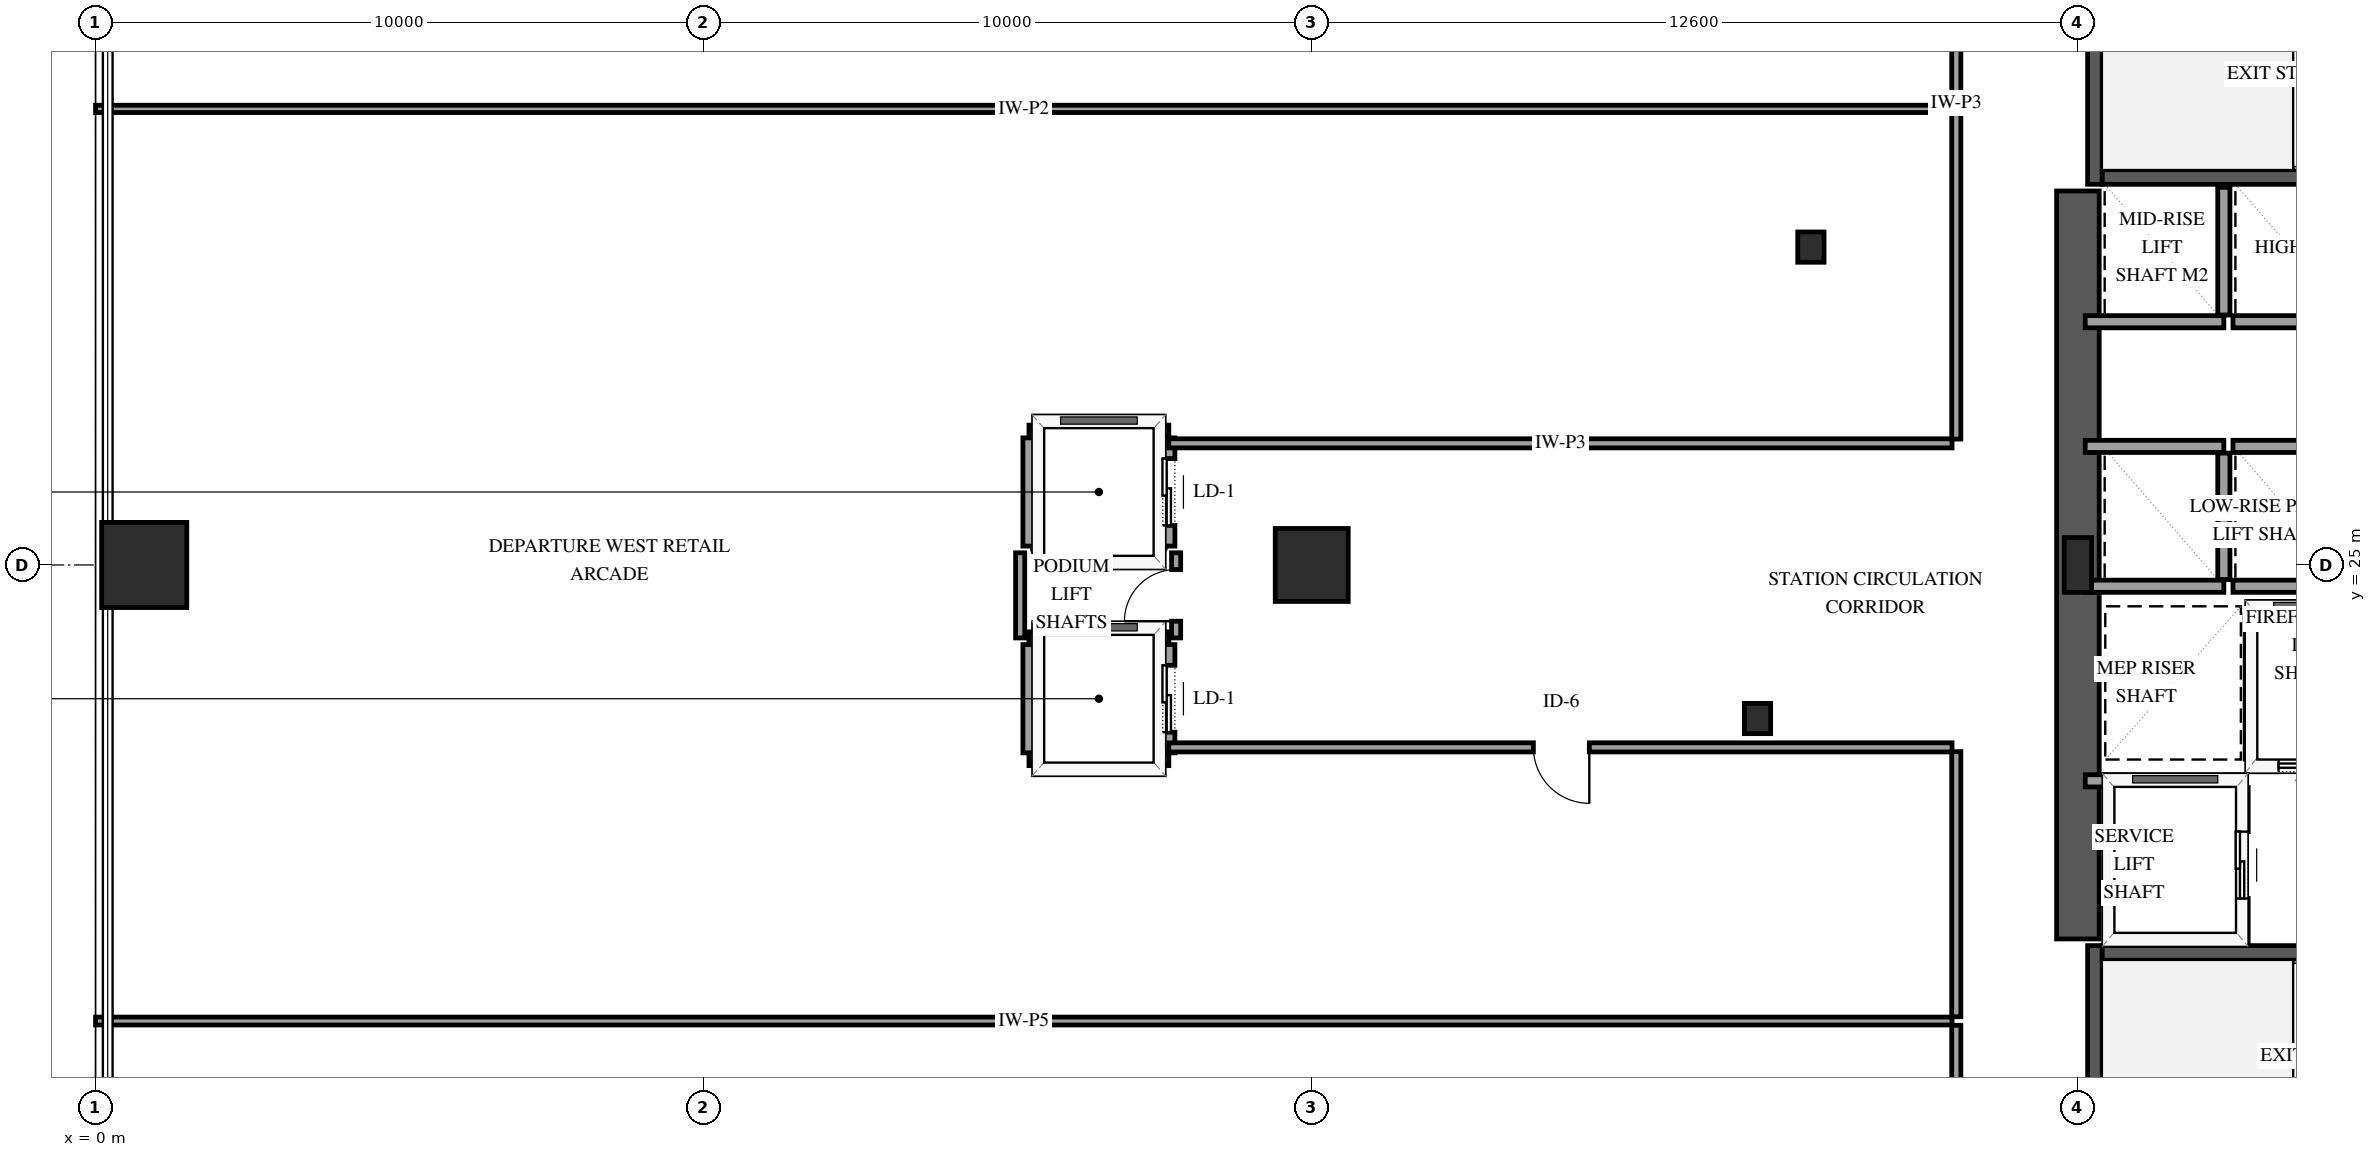
"""IFC4 building model, lengths in metres.
Left out: names, types, materials, properties, quantities, classifications, styles, units other than length and angle.
Written with IfcOpenShell. Run it as: python <this file> out.ifc"""

import sys

from ifc_helpers import new_model, si_unit, direction, frame, frame_2d, origin, origin_2d, place, context, subcontext, project, spatial, rectangle, i_section, extrude, element, fill, save


model = new_model("IFC4")
c1 = context("Model", 3, precision=1e-05, world=origin(), true_north=direction((0.0, 1.0)))
c2 = subcontext(c1, "Body", "Model", "MODEL_VIEW")
j1 = project(units=[si_unit("LENGTHUNIT", "METRE"), si_unit("PLANEANGLEUNIT", "RADIAN")], contexts=[c1])
p1 = place(None, origin())
s1 = spatial("IfcSite", under=j1, at=p1, CompositionType="ELEMENT")
p2 = place(p1, origin())
s2 = spatial("IfcBuilding", under=s1, at=p2, CompositionType="ELEMENT")
p3 = place(p2, frame((0.0, 0.0, 16.2)))
s3 = spatial("IfcBuildingStorey", under=s2, at=p3, CompositionType="ELEMENT", Elevation=16.2)
p4 = place(p3, frame((32.88, 15.11, 0.0), z_axis=(0.0, 0.0, 1.0), x_axis=(0.0, 1.0, 0.0)))
e1 = element("IfcWall", 1, at=p4, inside=s3, PredefinedType="SHEAR", context=c2, shape_type="SweptSolid", body=[
    extrude(rectangle(XDim=3.63, YDim=0.24, at=frame_2d((1.815, 0.0))), origin(), (0.0, 0.0, 1.0), 4.5),
])
p5 = place(p3, frame((33.0, 18.62, 0.0), z_axis=(0.0, 0.0, 1.0), x_axis=(1.0, 0.0, 0.0)))
e2 = element("IfcWall", 2, at=p5, inside=s3, PredefinedType="SHEAR", context=c2, shape_type="SweptSolid", body=[
    extrude(rectangle(XDim=8.0, YDim=0.24, at=frame_2d((4.0, 0.0))), origin(), (0.0, 0.0, 1.0), 4.5),
])
p6 = place(p3, frame((32.88, 31.26, 0.0), z_axis=(0.0, 0.0, 1.0), x_axis=(0.0, 1.0, 0.0)))
e3 = element("IfcWall", 3, at=p6, inside=s3, PredefinedType="SHEAR", context=c2, shape_type="SweptSolid", body=[
    extrude(rectangle(XDim=3.63, YDim=0.24, at=frame_2d((1.815, 0.0))), origin(), (0.0, 0.0, 1.0), 4.5),
])
p7 = place(p3, frame((33.0, 31.38, 0.0), z_axis=(0.0, 0.0, 1.0), x_axis=(1.0, 0.0, 0.0)))
e4 = element("IfcWall", 4, at=p7, inside=s3, PredefinedType="SHEAR", context=c2, shape_type="SweptSolid", body=[
    extrude(rectangle(XDim=8.0, YDim=0.24, at=frame_2d((4.0, 0.0))), origin(), (0.0, 0.0, 1.0), 4.5),
])
p8 = place(p3, frame((32.6, 18.85, 0.0), z_axis=(0.0, 0.0, 1.0), x_axis=(0.0, 1.0, 0.0)))
e5 = element("IfcWall", 5, at=p8, inside=s3, PredefinedType="SHEAR", context=c2, shape_type="SweptSolid", body=[
    extrude(rectangle(XDim=12.3, YDim=0.7, at=frame_2d((6.15, 0.0))), origin(), (0.0, 0.0, 1.0), 4.5),
])
p9 = place(p3, frame((32.6, 25.0, 0.0), z_axis=(0.0, 0.0, 1.0), x_axis=(1.0, 0.0, 0.0)))
e6 = element("IfcColumn", 6, at=p9, inside=s3, PredefinedType="PILASTER", context=c2, shape_type="SweptSolid", body=[
    extrude(rectangle(XDim=0.45, YDim=0.9, at=origin_2d()), origin(), (0.0, 0.0, 1.0), 4.5),
])
p10 = place(p3, frame((0.8, 25.0, 0.0), z_axis=(0.0, 0.0, 1.0), x_axis=(1.0, 0.0, 0.0)))
e7 = element("IfcColumn", 7, at=p10, inside=s3, PredefinedType="COLUMN", context=c2, shape_type="SweptSolid", body=[
    extrude(rectangle(XDim=1.4, YDim=1.4, at=origin_2d()), origin(), (0.0, 0.0, 1.0), 4.5),
])
p11 = place(p3, frame((20.0, 25.0, 0.0), z_axis=(0.0, 0.0, 1.0), x_axis=(1.0, 0.0, 0.0)))
e8 = element("IfcColumn", 8, at=p11, inside=s3, PredefinedType="COLUMN", context=c2, shape_type="SweptSolid", body=[
    extrude(rectangle(XDim=1.2, YDim=1.2, at=origin_2d()), origin(), (0.0, 0.0, 1.0), 4.5),
])
for number, where, z_axis, x_axis in (
    (9, (28.209, 30.227, 0.0), (0.0, 0.0, 1.0), (1.0, 0.0, 0.0)),
    (10, (27.331, 22.475, 0.0), (0.0, 0.0, 1.0), (1.0, 0.0, 0.0)),
):
    element("IfcColumn", number, at=place(p3, frame(where, z_axis=z_axis, x_axis=x_axis)), inside=s3, PredefinedType="COLUMN", context=c2, shape_type="SweptSolid", body=[
        extrude(i_section(OverallWidth=0.432, OverallDepth=0.498, WebThickness=0.056, FlangeThickness=0.089, FilletRadius=0.038, at=origin_2d()), origin(), (0.0, 0.0, 1.0), 4.5),
    ])
p12 = place(p3, frame((35.45, 21.7, 0.0), z_axis=(0.0, 0.0, 1.0), x_axis=(1.0, 0.0, 0.0)))
e11 = element("IfcWall", 11, at=p12, inside=s3, PredefinedType="SOLIDWALL", context=c2, shape_type="SweptSolid", body=[
    extrude(rectangle(XDim=2.0, YDim=0.2, at=frame_2d((1.0, 0.0))), origin(), (0.0, 0.0, 1.0), 4.18),
])
p13 = place(p12, frame((0.45, 0.0, 0.0)))
e12 = element("IfcOpeningElement", 12, at=p13, cuts=e11, PredefinedType="OPENING", context=c2, shape_type="SweptSolid", body=[
    extrude(rectangle(XDim=1.1, YDim=2.15, at=frame_2d((0.55, 1.075))), frame((0.0, 0.11, 0.0), z_axis=(0.0, -1.0, 0.0), x_axis=(1.0, 0.0, 0.0)), (0.0, 0.0, 1.0), 0.22),
])
p14 = place(p3, frame((35.45, 24.3, 0.0), z_axis=(0.0, 0.0, 1.0), x_axis=(1.0, 0.0, 0.0)))
e13 = element("IfcWall", 13, at=p14, inside=s3, PredefinedType="SOLIDWALL", context=c2, shape_type="SweptSolid", body=[
    extrude(rectangle(XDim=2.0, YDim=0.2, at=frame_2d((1.0, 0.0))), origin(), (0.0, 0.0, 1.0), 4.18),
])
p15 = place(p3, frame((35.45, 21.81, 0.0), z_axis=(0.0, 0.0, 1.0), x_axis=(0.0, 1.0, 0.0)))
e14 = element("IfcWall", 14, at=p15, inside=s3, PredefinedType="SOLIDWALL", context=c2, shape_type="SweptSolid", body=[
    extrude(rectangle(XDim=2.38, YDim=0.2, at=frame_2d((1.19, 0.0))), origin(), (0.0, 0.0, 1.0), 4.18),
])
p16 = place(p3, frame((32.72, 21.45, 0.0), z_axis=(0.0, 0.0, 1.0), x_axis=(1.0, 0.0, 0.0)))
e15 = element("IfcWall", 15, at=p16, inside=s3, PredefinedType="SOLIDWALL", context=c2, shape_type="SweptSolid", body=[
    extrude(rectangle(XDim=2.58, YDim=0.2, at=frame_2d((1.29, 0.0))), origin(), (0.0, 0.0, 1.0), 4.18),
])
p17 = place(p3, frame((35.3, 18.79, 0.0), z_axis=(0.0, 0.0, 1.0), x_axis=(0.0, 1.0, 0.0)))
e16 = element("IfcWall", 16, at=p17, inside=s3, PredefinedType="SOLIDWALL", context=c2, shape_type="SweptSolid", body=[
    extrude(rectangle(XDim=2.55, YDim=0.2, at=frame_2d((1.275, 0.0))), origin(), (0.0, 0.0, 1.0), 4.18),
])
p18 = place(p17, frame((0.725, 0.0, 0.0)))
e17 = element("IfcOpeningElement", 17, at=p18, cuts=e16, PredefinedType="OPENING", context=c2, shape_type="SweptSolid", body=[
    extrude(rectangle(XDim=1.1, YDim=2.15, at=frame_2d((0.55, 1.075))), frame((0.0, 0.11, 0.0), z_axis=(0.0, -1.0, 0.0), x_axis=(1.0, 0.0, 0.0)), (0.0, 0.0, 1.0), 0.22),
])
for number, where, z_axis, x_axis in (
    (18, (15.35, 21.8, 0.0), (0.0, 0.0, 1.0), (1.0, 0.0, 0.0)),
    (19, (15.35, 23.8, 0.0), (0.0, 0.0, 1.0), (1.0, 0.0, 0.0)),
):
    element("IfcWall", number, at=place(p3, frame(where, z_axis=z_axis, x_axis=x_axis)), inside=s3, PredefinedType="SOLIDWALL", context=c2, shape_type="SweptSolid", body=[
        extrude(rectangle(XDim=2.3, YDim=0.2, at=frame_2d((1.15, 0.0))), origin(), (0.0, 0.0, 1.0), 4.18),
    ])
p19 = place(p3, frame((15.35, 21.91, 0.0), z_axis=(0.0, 0.0, 1.0), x_axis=(0.0, 1.0, 0.0)))
e20 = element("IfcWall", 20, at=p19, inside=s3, PredefinedType="SOLIDWALL", context=c2, shape_type="SweptSolid", body=[
    extrude(rectangle(XDim=1.78, YDim=0.2, at=frame_2d((0.89, 0.0))), origin(), (0.0, 0.0, 1.0), 4.18),
])
p20 = place(p3, frame((17.65, 21.91, 0.0), z_axis=(0.0, 0.0, 1.0), x_axis=(0.0, 1.0, 0.0)))
e21 = element("IfcWall", 21, at=p20, inside=s3, PredefinedType="SOLIDWALL", context=c2, shape_type="SweptSolid", body=[
    extrude(rectangle(XDim=1.78, YDim=0.2, at=frame_2d((0.89, 0.0))), origin(), (0.0, 0.0, 1.0), 4.18),
])
p21 = place(p20, frame((0.34, 0.0, 0.0)))
e22 = element("IfcOpeningElement", 22, at=p21, cuts=e21, PredefinedType="OPENING", context=c2, shape_type="SweptSolid", body=[
    extrude(rectangle(XDim=1.1, YDim=2.15, at=frame_2d((0.55, 1.075))), frame((0.0, 0.11, 0.0), z_axis=(0.0, -1.0, 0.0), x_axis=(1.0, 0.0, 0.0)), (0.0, 0.0, 1.0), 0.22),
])
p22 = place(p3, frame((15.35, 27.2, 0.0), z_axis=(0.0, 0.0, 1.0), x_axis=(1.0, 0.0, 0.0)))
e23 = element("IfcWall", 23, at=p22, inside=s3, PredefinedType="SOLIDWALL", context=c2, shape_type="SweptSolid", body=[
    extrude(rectangle(XDim=2.3, YDim=0.2, at=frame_2d((1.15, 0.0))), origin(), (0.0, 0.0, 1.0), 4.18),
])
p23 = place(p3, frame((15.35, 25.31, 0.0), z_axis=(0.0, 0.0, 1.0), x_axis=(0.0, 1.0, 0.0)))
e24 = element("IfcWall", 24, at=p23, inside=s3, PredefinedType="SOLIDWALL", context=c2, shape_type="SweptSolid", body=[
    extrude(rectangle(XDim=1.78, YDim=0.2, at=frame_2d((0.89, 0.0))), origin(), (0.0, 0.0, 1.0), 4.18),
])
p24 = place(p3, frame((17.65, 25.31, 0.0), z_axis=(0.0, 0.0, 1.0), x_axis=(0.0, 1.0, 0.0)))
e25 = element("IfcWall", 25, at=p24, inside=s3, PredefinedType="SOLIDWALL", context=c2, shape_type="SweptSolid", body=[
    extrude(rectangle(XDim=1.78, YDim=0.2, at=frame_2d((0.89, 0.0))), origin(), (0.0, 0.0, 1.0), 4.18),
])
p25 = place(p24, frame((0.34, 0.0, 0.0)))
e26 = element("IfcOpeningElement", 26, at=p25, cuts=e25, PredefinedType="OPENING", context=c2, shape_type="SweptSolid", body=[
    extrude(rectangle(XDim=1.1, YDim=2.15, at=frame_2d((0.55, 1.075))), frame((0.0, 0.11, 0.0), z_axis=(0.0, -1.0, 0.0), x_axis=(1.0, 0.0, 0.0)), (0.0, 0.0, 1.0), 0.22),
])
for number, where, z_axis, x_axis in (
    (27, (32.72, 24.65, 0.0), (0.0, 0.0, 1.0), (1.0, 0.0, 0.0)),
    (28, (32.72, 26.95, 0.0), (0.0, 0.0, 1.0), (1.0, 0.0, 0.0)),
):
    element("IfcWall", number, at=place(p3, frame(where, z_axis=z_axis, x_axis=x_axis)), inside=s3, PredefinedType="SOLIDWALL", context=c2, shape_type="SweptSolid", body=[
        extrude(rectangle(XDim=2.28, YDim=0.2, at=frame_2d((1.14, 0.0))), origin(), (0.0, 0.0, 1.0), 4.18),
    ])
p26 = place(p3, frame((35.0, 24.76, 0.0), z_axis=(0.0, 0.0, 1.0), x_axis=(0.0, 1.0, 0.0)))
e29 = element("IfcWall", 29, at=p26, inside=s3, PredefinedType="SOLIDWALL", context=c2, shape_type="SweptSolid", body=[
    extrude(rectangle(XDim=2.08, YDim=0.2, at=frame_2d((1.04, 0.0))), origin(), (0.0, 0.0, 1.0), 4.18),
])
for number, where, z_axis, x_axis in (
    (30, (35.15, 24.65, 0.0), (0.0, 0.0, 1.0), (1.0, 0.0, 0.0)),
    (31, (35.15, 26.95, 0.0), (0.0, 0.0, 1.0), (1.0, 0.0, 0.0)),
):
    element("IfcWall", number, at=place(p3, frame(where, z_axis=z_axis, x_axis=x_axis)), inside=s3, PredefinedType="SOLIDWALL", context=c2, shape_type="SweptSolid", body=[
        extrude(rectangle(XDim=2.0, YDim=0.2, at=frame_2d((1.0, 0.0))), origin(), (0.0, 0.0, 1.0), 4.18),
    ])
p27 = place(p3, frame((32.72, 29.0, 0.0), z_axis=(0.0, 0.0, 1.0), x_axis=(1.0, 0.0, 0.0)))
e32 = element("IfcWall", 32, at=p27, inside=s3, PredefinedType="SOLIDWALL", context=c2, shape_type="SweptSolid", body=[
    extrude(rectangle(XDim=2.28, YDim=0.2, at=frame_2d((1.14, 0.0))), origin(), (0.0, 0.0, 1.0), 4.18),
])
p28 = place(p3, frame((35.0, 29.11, 0.0), z_axis=(0.0, 0.0, 1.0), x_axis=(0.0, 1.0, 0.0)))
e33 = element("IfcWall", 33, at=p28, inside=s3, PredefinedType="SOLIDWALL", context=c2, shape_type="SweptSolid", body=[
    extrude(rectangle(XDim=2.1, YDim=0.2, at=frame_2d((1.05, 0.0))), origin(), (0.0, 0.0, 1.0), 4.18),
])
p29 = place(p3, frame((35.15, 29.0, 0.0), z_axis=(0.0, 0.0, 1.0), x_axis=(1.0, 0.0, 0.0)))
e34 = element("IfcWall", 34, at=p29, inside=s3, PredefinedType="SOLIDWALL", context=c2, shape_type="SweptSolid", body=[
    extrude(rectangle(XDim=2.0, YDim=0.2, at=frame_2d((1.0, 0.0))), origin(), (0.0, 0.0, 1.0), 4.18),
])
p30 = place(p3, frame((0.0, 17.5, 0.0), z_axis=(0.0, 0.0, 1.0), x_axis=(1.0, 0.0, 0.0)))
e35 = element("IfcWall", 35, at=p30, inside=s3, PredefinedType="PARTITIONING", context=c2, shape_type="SweptSolid", body=[
    extrude(rectangle(XDim=30.53, YDim=0.13, at=frame_2d((15.265, 0.0))), origin(), (0.0, 0.0, 1.0), 4.18),
])
p31 = place(p3, frame((0.0, 32.5, 0.0), z_axis=(0.0, 0.0, 1.0), x_axis=(1.0, 0.0, 0.0)))
e36 = element("IfcWall", 36, at=p31, inside=s3, PredefinedType="PARTITIONING", context=c2, shape_type="SweptSolid", body=[
    extrude(rectangle(XDim=30.53, YDim=0.12, at=frame_2d((15.265, 0.0))), origin(), (0.0, 0.0, 1.0), 4.18),
])
p32 = place(p3, frame((30.53, 22.0, 0.0), z_axis=(0.0, 0.0, 1.0), x_axis=(-1.0, 0.0, 0.0)))
e37 = element("IfcWall", 37, at=p32, inside=s3, PredefinedType="PARTITIONING", context=c2, shape_type="SweptSolid", body=[
    extrude(rectangle(XDim=12.88, YDim=0.15, at=frame_2d((6.44, 0.0))), origin(), (0.0, 0.0, 1.0), 4.18),
])
p33 = place(p32, frame((5.965, 0.0, 0.0)))
e38 = element("IfcOpeningElement", 38, at=p33, cuts=e37, PredefinedType="OPENING", context=c2, shape_type="SweptSolid", body=[
    extrude(rectangle(XDim=0.92, YDim=2.12, at=frame_2d((0.46, 1.06))), frame((0.0, 0.085, 0.0), z_axis=(0.0, -1.0, 0.0), x_axis=(1.0, 0.0, 0.0)), (0.0, 0.0, 1.0), 0.17),
])
p34 = place(p3, frame((17.65, 27.0, 0.0), z_axis=(0.0, 0.0, 1.0), x_axis=(1.0, 0.0, 0.0)))
e39 = element("IfcWall", 39, at=p34, inside=s3, PredefinedType="PARTITIONING", context=c2, shape_type="SweptSolid", body=[
    extrude(rectangle(XDim=12.88, YDim=0.15, at=frame_2d((6.44, 0.0))), origin(), (0.0, 0.0, 1.0), 4.18),
])
p35 = place(p3, frame((30.6, 7.07, 0.0), z_axis=(0.0, 0.0, 1.0), x_axis=(0.0, 1.0, 0.0)))
e40 = element("IfcWall", 40, at=p35, inside=s3, PredefinedType="PARTITIONING", context=c2, shape_type="SweptSolid", body=[
    extrude(rectangle(XDim=10.36, YDim=0.15, at=frame_2d((5.18, 0.0))), origin(), (0.0, 0.0, 1.0), 4.18),
])
p36 = place(p3, frame((30.6, 32.57, 0.0), z_axis=(0.0, 0.0, 1.0), x_axis=(0.0, 1.0, 0.0)))
e41 = element("IfcWall", 41, at=p36, inside=s3, PredefinedType="PARTITIONING", context=c2, shape_type="SweptSolid", body=[
    extrude(rectangle(XDim=5.56, YDim=0.15, at=frame_2d((2.78, 0.0))), origin(), (0.0, 0.0, 1.0), 4.18),
])
p37 = place(p3, frame((30.6, 27.07, 0.0), z_axis=(0.0, 0.0, 1.0), x_axis=(0.0, 1.0, 0.0)))
e42 = element("IfcWall", 42, at=p37, inside=s3, PredefinedType="PARTITIONING", context=c2, shape_type="SweptSolid", body=[
    extrude(rectangle(XDim=5.36, YDim=0.15, at=frame_2d((2.68, 0.0))), origin(), (0.0, 0.0, 1.0), 4.18),
])
p38 = place(p3, frame((30.6, 17.57, 0.0), z_axis=(0.0, 0.0, 1.0), x_axis=(0.0, 1.0, 0.0)))
e43 = element("IfcWall", 43, at=p38, inside=s3, PredefinedType="PARTITIONING", context=c2, shape_type="SweptSolid", body=[
    extrude(rectangle(XDim=4.36, YDim=0.15, at=frame_2d((2.18, 0.0))), origin(), (0.0, 0.0, 1.0), 4.18),
])
p39 = place(p3, frame((17.77, 23.8, 0.0), z_axis=(0.0, 0.0, 1.0), x_axis=(0.0, 1.0, 0.0)))
e44 = element("IfcWall", 44, at=p39, inside=s3, PredefinedType="PARTITIONING", context=c2, shape_type="SweptSolid", body=[
    extrude(rectangle(XDim=1.4, YDim=0.15, at=frame_2d((0.7, 0.0))), origin(), (0.0, 0.0, 1.0), 4.18),
])
p40 = place(p39, frame((0.275, 0.0, 0.0)))
e45 = element("IfcOpeningElement", 45, at=p40, cuts=e44, PredefinedType="OPENING", context=c2, shape_type="SweptSolid", body=[
    extrude(rectangle(XDim=0.85, YDim=2.1, at=frame_2d((0.425, 1.05))), frame((0.0, 0.085, 0.0), z_axis=(0.0, -1.0, 0.0), x_axis=(1.0, 0.0, 0.0)), (0.0, 0.0, 1.0), 0.17),
])
p41 = place(p3, frame((15.205, 23.8, 0.0), z_axis=(0.0, 0.0, 1.0), x_axis=(0.0, 1.0, 0.0)))
e46 = element("IfcWall", 46, at=p41, inside=s3, PredefinedType="PARTITIONING", context=c2, shape_type="SweptSolid", body=[
    extrude(rectangle(XDim=1.4, YDim=0.15, at=frame_2d((0.7, 0.0))), origin(), (0.0, 0.0, 1.0), 4.18),
])
p42 = place(p13, origin())
e47 = element("IfcDoor", 47, at=p42, inside=s3, OperationType="SLIDING_TO_LEFT", PredefinedType="DOOR", context=c2, shape_type="SweptSolid", body=[
    extrude(rectangle(XDim=1.1, YDim=2.15, at=frame_2d((0.55, 1.075))), frame((0.0, 0.025, 0.0), z_axis=(0.0, -1.0, 0.0), x_axis=(1.0, 0.0, 0.0)), (0.0, 0.0, 1.0), 0.05),
])
fill(e12, e47)
p43 = place(p18, origin())
e48 = element("IfcDoor", 48, at=p43, inside=s3, OperationType="SLIDING_TO_LEFT", PredefinedType="DOOR", context=c2, shape_type="SweptSolid", body=[
    extrude(rectangle(XDim=1.1, YDim=2.15, at=frame_2d((0.55, 1.075))), frame((0.0, 0.025, 0.0), z_axis=(0.0, -1.0, 0.0), x_axis=(1.0, 0.0, 0.0)), (0.0, 0.0, 1.0), 0.05),
])
fill(e17, e48)
p44 = place(p21, origin())
e49 = element("IfcDoor", 49, at=p44, inside=s3, OperationType="SLIDING_TO_LEFT", PredefinedType="DOOR", context=c2, shape_type="SweptSolid", body=[
    extrude(rectangle(XDim=1.1, YDim=2.15, at=frame_2d((0.55, 1.075))), frame((0.0, 0.025, 0.0), z_axis=(0.0, -1.0, 0.0), x_axis=(1.0, 0.0, 0.0)), (0.0, 0.0, 1.0), 0.05),
])
fill(e22, e49)
p45 = place(p25, origin())
e50 = element("IfcDoor", 50, at=p45, inside=s3, OperationType="SLIDING_TO_LEFT", PredefinedType="DOOR", context=c2, shape_type="SweptSolid", body=[
    extrude(rectangle(XDim=1.1, YDim=2.15, at=frame_2d((0.55, 1.075))), frame((0.0, 0.025, 0.0), z_axis=(0.0, -1.0, 0.0), x_axis=(1.0, 0.0, 0.0)), (0.0, 0.0, 1.0), 0.05),
])
fill(e26, e50)
p46 = place(p33, origin())
e51 = element("IfcDoor", 51, at=p46, inside=s3, OperationType="SINGLE_SWING_LEFT", PredefinedType="DOOR", context=c2, shape_type="SweptSolid", body=[
    extrude(rectangle(XDim=0.92, YDim=2.12, at=frame_2d((0.46, 1.06))), frame((0.0, 0.025, 0.0), z_axis=(0.0, -1.0, 0.0), x_axis=(1.0, 0.0, 0.0)), (0.0, 0.0, 1.0), 0.05),
])
fill(e38, e51)
p47 = place(p40, origin())
e52 = element("IfcDoor", 52, at=p47, inside=s3, OperationType="SINGLE_SWING_LEFT", PredefinedType="DOOR", context=c2, shape_type="SweptSolid", body=[
    extrude(rectangle(XDim=0.85, YDim=2.1, at=frame_2d((0.425, 1.05))), frame((0.0, 0.025, 0.0), z_axis=(0.0, -1.0, 0.0), x_axis=(1.0, 0.0, 0.0)), (0.0, 0.0, 1.0), 0.05),
])
fill(e45, e52)
save(model, sys.argv[1])
